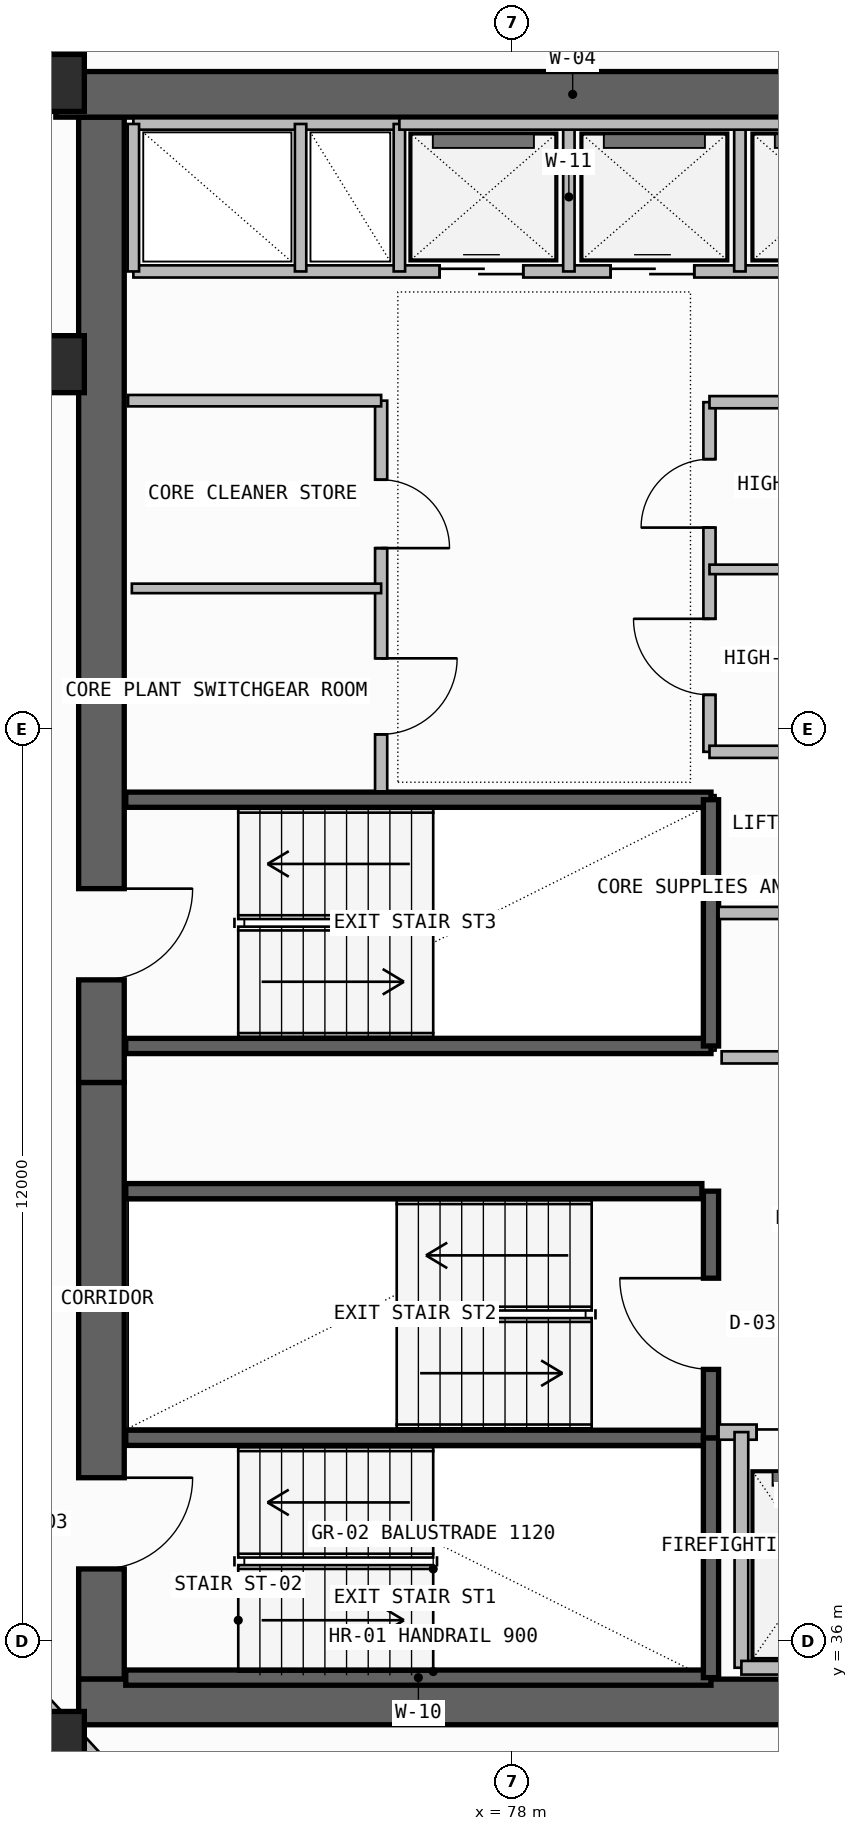
"""IFC4 building model, lengths in metres.
Left out: names, types, materials, properties, quantities, classifications, styles, units other than length and angle.
Written with IfcOpenShell. Run it as: python <this file> out.ifc"""

import sys

from ifc_helpers import new_model, si_unit, direction, frame, frame_2d, origin, origin_2d, place, context, subcontext, project, spatial, rectangle, extrude, element, fill, save


model = new_model("IFC4")
c1 = context("Model", 3, precision=1e-05, world=origin(), true_north=direction((0.0, 1.0)))
c2 = subcontext(c1, "Body", "Model", "MODEL_VIEW")
j1 = project(units=[si_unit("LENGTHUNIT", "METRE"), si_unit("PLANEANGLEUNIT", "RADIAN")], contexts=[c1])
p1 = place(None, origin())
s1 = spatial("IfcSite", under=j1, at=p1, CompositionType="ELEMENT")
p2 = place(p1, origin())
s2 = spatial("IfcBuilding", under=s1, at=p2, CompositionType="ELEMENT")
p3 = place(p2, frame((0.0, 0.0, 264.26)))
s3 = spatial("IfcBuildingStorey", under=s2, at=p3, CompositionType="ELEMENT", Elevation=264.26)
p4 = place(p3, frame((72.6, 35.5, -0.26), z_axis=(0.0, 0.0, 1.0), x_axis=(0.0, 1.0, 0.0)))
e1 = element("IfcWall", 1, at=p4, inside=s3, PredefinedType="SHEAR", context=c2, shape_type="SweptSolid", body=[
    extrude(rectangle(XDim=7.85, YDim=0.6, at=frame_2d((3.925, 0.0))), origin(), (0.0, 0.0, 1.0), 3.52),
])
p5 = place(p4, frame((1.45, 0.0, 0.26)))
e2 = element("IfcOpeningElement", 2, at=p5, cuts=e1, PredefinedType="OPENING", context=c2, shape_type="SweptSolid", body=[
    extrude(rectangle(XDim=1.2, YDim=2.2, at=frame_2d((0.6, 1.1))), frame((0.0, 0.31, 0.0), z_axis=(0.0, -1.0, 0.0), x_axis=(1.0, 0.0, 0.0)), (0.0, 0.0, 1.0), 0.62),
])
p6 = place(p3, frame((72.3, 35.2, -0.26), z_axis=(0.0, 0.0, 1.0), x_axis=(1.0, 0.0, 0.0)))
e3 = element("IfcWall", 3, at=p6, inside=s3, PredefinedType="SHEAR", context=c2, shape_type="SweptSolid", body=[
    extrude(rectangle(XDim=13.3, YDim=0.6, at=frame_2d((6.65, 0.0))), origin(), (0.0, 0.0, 1.0), 3.52),
])
p7 = place(p3, frame((72.6, 43.35, -0.26), z_axis=(0.0, 0.0, 1.0), x_axis=(0.0, 1.0, 0.0)))
e4 = element("IfcWall", 4, at=p7, inside=s3, PredefinedType="SHEAR", context=c2, shape_type="SweptSolid", body=[
    extrude(rectangle(XDim=12.7, YDim=0.6, at=frame_2d((6.35, 0.0))), origin(), (0.0, 0.0, 1.0), 3.52),
])
p8 = place(p7, frame((1.35, 0.0, 0.26)))
e5 = element("IfcOpeningElement", 5, at=p8, cuts=e4, PredefinedType="OPENING", context=c2, shape_type="SweptSolid", body=[
    extrude(rectangle(XDim=1.2, YDim=2.2, at=frame_2d((0.6, 1.1))), frame((0.0, 0.31, 0.0), z_axis=(0.0, -1.0, 0.0), x_axis=(1.0, 0.0, 0.0)), (0.0, 0.0, 1.0), 0.62),
])
p9 = place(p3, frame((72.0, 56.35, -0.26), z_axis=(0.0, 0.0, 1.0), x_axis=(1.0, 0.0, 0.0)))
e6 = element("IfcWall", 6, at=p9, inside=s3, PredefinedType="SHEAR", context=c2, shape_type="SweptSolid", body=[
    extrude(rectangle(XDim=13.6, YDim=0.6, at=frame_2d((6.8, 0.0))), origin(), (0.0, 0.0, 1.0), 3.52),
])
for number, where, z_axis, x_axis in (
    (7, (72.0, 34.7, 0.0), (0.0, 0.0, 1.0), (1.0, 0.0, 0.0)),
    (8, (72.0, 52.8, 0.0), (0.0, 0.0, 1.0), (1.0, 0.0, 0.0)),
    (9, (72.0, 56.5, 0.0), (0.0, 0.0, 1.0), (1.0, 0.0, 0.0)),
):
    element("IfcColumn", number, at=place(p3, frame(where, z_axis=z_axis, x_axis=x_axis)), inside=s3, PredefinedType="COLUMN", context=c2, shape_type="SweptSolid", body=[
        extrude(rectangle(XDim=0.75, YDim=0.75, at=origin_2d()), origin(), (0.0, 0.0, 1.0), 3.52),
    ])
p10 = place(p3, frame((72.881, 34.058, 0.0), z_axis=(0.0, 0.0, 1.0), x_axis=(-0.678651758246, 0.734460203843, 0.0)))
e10 = element("IfcWall", 10, at=p10, inside=s3, PredefinedType="PARAPET", context=c2, shape_type="SweptSolid", body=[
    extrude(rectangle(XDim=0.927, YDim=0.2, at=frame_2d((0.464, 0.0))), origin(), (0.0, 0.0, 1.0), 1.15),
])
p11 = place(p3, frame((72.059, 34.948, 0.0), z_axis=(0.0, 0.0, 1.0), x_axis=(-0.678740051818, 0.734378609478, 0.0)))
e11 = element("IfcWall", 11, at=p11, inside=s3, PredefinedType="PARAPET", context=c2, shape_type="SweptSolid", body=[
    extrude(rectangle(XDim=0.97, YDim=0.2, at=frame_2d((0.485, 0.0))), origin(), (0.0, 0.0, 1.0), 1.15),
])
for number, where, z_axis, x_axis in (
    (12, (72.92, 35.52, -0.26), (0.0, 0.0, 1.0), (1.0, 0.0, 0.0)),
    (13, (72.92, 38.675, -0.26), (0.0, 0.0, 1.0), (1.0, 0.0, 0.0)),
):
    element("IfcWall", number, at=place(p3, frame(where, z_axis=z_axis, x_axis=x_axis)), inside=s3, PredefinedType="SOLIDWALL", context=c2, shape_type="SweptSolid", body=[
        extrude(rectangle(XDim=7.7, YDim=0.2, at=frame_2d((3.85, 0.0))), origin(), (0.0, 0.0, 1.0), 3.52),
    ])
p12 = place(p3, frame((80.62, 35.52, -0.26), z_axis=(0.0, 0.0, 1.0), x_axis=(0.0, 1.0, 0.0)))
e14 = element("IfcWall", 14, at=p12, inside=s3, PredefinedType="SOLIDWALL", context=c2, shape_type="SweptSolid", body=[
    extrude(rectangle(XDim=3.155, YDim=0.2, at=frame_2d((1.578, 0.0))), origin(), (0.0, 0.0, 1.0), 3.52),
])
p13 = place(p3, frame((80.62, 38.675, -0.26), z_axis=(0.0, 0.0, 1.0), x_axis=(0.0, 1.0, 0.0)))
e15 = element("IfcWall", 15, at=p13, inside=s3, PredefinedType="SOLIDWALL", context=c2, shape_type="SweptSolid", body=[
    extrude(rectangle(XDim=3.245, YDim=0.2, at=frame_2d((1.623, 0.0))), origin(), (0.0, 0.0, 1.0), 3.52),
])
p14 = place(p13, frame((0.9, 0.0, 0.26)))
e16 = element("IfcOpeningElement", 16, at=p14, cuts=e15, PredefinedType="OPENING", context=c2, shape_type="SweptSolid", body=[
    extrude(rectangle(XDim=1.2, YDim=2.2, at=frame_2d((0.6, 1.1))), frame((0.0, 0.11, 0.0), z_axis=(0.0, -1.0, 0.0), x_axis=(1.0, 0.0, 0.0)), (0.0, 0.0, 1.0), 0.22),
])
p15 = place(p3, frame((80.72, 38.75, 0.0), z_axis=(0.0, 0.0, 1.0), x_axis=(1.0, 0.0, 0.0)))
e17 = element("IfcWall", 17, at=p15, inside=s3, PredefinedType="SOLIDWALL", context=c2, shape_type="SweptSolid", body=[
    extrude(rectangle(XDim=4.26, YDim=0.2, at=frame_2d((2.13, 0.0))), origin(), (0.0, 0.0, 1.0), 3.26),
])
p16 = place(p15, frame((0.5, 0.0, 0.0)))
e18 = element("IfcOpeningElement", 18, at=p16, cuts=e17, PredefinedType="OPENING", context=c2, shape_type="SweptSolid", body=[
    extrude(rectangle(XDim=1.3, YDim=2.3, at=frame_2d((0.65, 1.15))), frame((0.0, 0.11, 0.0), z_axis=(0.0, -1.0, 0.0), x_axis=(1.0, 0.0, 0.0)), (0.0, 0.0, 1.0), 0.22),
])
p17 = place(p15, frame((2.45, 0.0, 0.0)))
e19 = element("IfcOpeningElement", 19, at=p17, cuts=e17, PredefinedType="OPENING", context=c2, shape_type="SweptSolid", body=[
    extrude(rectangle(XDim=1.3, YDim=2.3, at=frame_2d((0.65, 1.15))), frame((0.0, 0.11, 0.0), z_axis=(0.0, -1.0, 0.0), x_axis=(1.0, 0.0, 0.0)), (0.0, 0.0, 1.0), 0.22),
])
p18 = place(p3, frame((81.02, 35.65, 0.0), z_axis=(0.0, 0.0, 1.0), x_axis=(0.0, 1.0, 0.0)))
e20 = element("IfcWall", 20, at=p18, inside=s3, PredefinedType="SOLIDWALL", context=c2, shape_type="SweptSolid", body=[
    extrude(rectangle(XDim=3.1, YDim=0.18, at=frame_2d((1.55, 0.0))), origin(), (0.0, 0.0, 1.0), 3.26),
])
p19 = place(p3, frame((81.02, 35.65, 0.0), z_axis=(0.0, 0.0, 1.0), x_axis=(1.0, 0.0, 0.0)))
e21 = element("IfcWall", 21, at=p19, inside=s3, PredefinedType="SOLIDWALL", context=c2, shape_type="SweptSolid", body=[
    extrude(rectangle(XDim=3.93, YDim=0.18, at=frame_2d((1.965, 0.0))), origin(), (0.0, 0.0, 1.0), 3.26),
])
p20 = place(p3, frame((72.92, 41.92, -0.26), z_axis=(0.0, 0.0, 1.0), x_axis=(1.0, 0.0, 0.0)))
e22 = element("IfcWall", 22, at=p20, inside=s3, PredefinedType="SOLIDWALL", context=c2, shape_type="SweptSolid", body=[
    extrude(rectangle(XDim=7.58, YDim=0.2, at=frame_2d((3.79, 0.0))), origin(), (0.0, 0.0, 1.0), 3.52),
])
for number, where, z_axis, x_axis in (
    (23, (72.92, 43.83, -0.26), (0.0, 0.0, 1.0), (1.0, 0.0, 0.0)),
    (24, (72.92, 47.07, -0.26), (0.0, 0.0, 1.0), (1.0, 0.0, 0.0)),
):
    element("IfcWall", number, at=place(p3, frame(where, z_axis=z_axis, x_axis=x_axis)), inside=s3, PredefinedType="SOLIDWALL", context=c2, shape_type="SweptSolid", body=[
        extrude(rectangle(XDim=7.7, YDim=0.2, at=frame_2d((3.85, 0.0))), origin(), (0.0, 0.0, 1.0), 3.52),
    ])
p21 = place(p3, frame((80.62, 43.83, -0.26), z_axis=(0.0, 0.0, 1.0), x_axis=(0.0, 1.0, 0.0)))
e25 = element("IfcWall", 25, at=p21, inside=s3, PredefinedType="SOLIDWALL", context=c2, shape_type="SweptSolid", body=[
    extrude(rectangle(XDim=3.24, YDim=0.2, at=frame_2d((1.62, 0.0))), origin(), (0.0, 0.0, 1.0), 3.52),
])
p22 = place(p3, frame((80.72, 45.58, 0.0), z_axis=(0.0, 0.0, 1.0), x_axis=(1.0, 0.0, 0.0)))
e26 = element("IfcWall", 26, at=p22, inside=s3, PredefinedType="PLUMBINGWALL", context=c2, shape_type="SweptSolid", body=[
    extrude(rectangle(XDim=4.23, YDim=0.16, at=frame_2d((2.115, 0.0))), origin(), (0.0, 0.0, 1.0), 3.26),
])
p23 = place(p22, frame((1.65, 0.0, 0.0)))
e27 = element("IfcOpeningElement", 27, at=p23, cuts=e26, PredefinedType="OPENING", context=c2, shape_type="SweptSolid", body=[
    extrude(rectangle(XDim=0.9, YDim=2.1, at=frame_2d((0.45, 1.05))), frame((0.0, 0.09, 0.0), z_axis=(0.0, -1.0, 0.0), x_axis=(1.0, 0.0, 0.0)), (0.0, 0.0, 1.0), 0.18),
])
p24 = place(p3, frame((80.76, 43.68, 0.0), z_axis=(0.0, 0.0, 1.0), x_axis=(1.0, 0.0, 0.0)))
e28 = element("IfcWall", 28, at=p24, inside=s3, PredefinedType="PLUMBINGWALL", context=c2, shape_type="SweptSolid", body=[
    extrude(rectangle(XDim=4.19, YDim=0.16, at=frame_2d((2.095, 0.0))), origin(), (0.0, 0.0, 1.0), 3.26),
])
p25 = place(p3, frame((76.28, 47.18, 0.0), z_axis=(0.0, 0.0, 1.0), x_axis=(0.0, 1.0, 0.0)))
e29 = element("IfcWall", 29, at=p25, inside=s3, PredefinedType="SOLIDWALL", context=c2, shape_type="SweptSolid", body=[
    extrude(rectangle(XDim=5.14, YDim=0.16, at=frame_2d((2.57, 0.0))), origin(), (0.0, 0.0, 1.0), 3.26),
])
p26 = place(p25, frame((0.75, 0.0, 0.0)))
e30 = element("IfcOpeningElement", 30, at=p26, cuts=e29, PredefinedType="OPENING", context=c2, shape_type="SweptSolid", body=[
    extrude(rectangle(XDim=1.0, YDim=2.2, at=frame_2d((0.5, 1.1))), frame((0.0, 0.09, 0.0), z_axis=(0.0, -1.0, 0.0), x_axis=(1.0, 0.0, 0.0)), (0.0, 0.0, 1.0), 0.18),
])
p27 = place(p25, frame((3.2, 0.0, 0.0)))
e31 = element("IfcOpeningElement", 31, at=p27, cuts=e29, PredefinedType="OPENING", context=c2, shape_type="SweptSolid", body=[
    extrude(rectangle(XDim=0.9, YDim=2.1, at=frame_2d((0.45, 1.05))), frame((0.0, 0.09, 0.0), z_axis=(0.0, -1.0, 0.0), x_axis=(1.0, 0.0, 0.0)), (0.0, 0.0, 1.0), 0.18),
])
p28 = place(p3, frame((72.95, 52.32, 0.0), z_axis=(0.0, 0.0, 1.0), x_axis=(1.0, 0.0, 0.0)))
e32 = element("IfcWall", 32, at=p28, inside=s3, PredefinedType="SOLIDWALL", context=c2, shape_type="SweptSolid", body=[
    extrude(rectangle(XDim=3.33, YDim=0.15, at=frame_2d((1.665, 0.0))), origin(), (0.0, 0.0, 1.0), 3.26),
])
p29 = place(p3, frame((73.0, 49.85, 0.0), z_axis=(0.0, 0.0, 1.0), x_axis=(1.0, 0.0, 0.0)))
e33 = element("IfcWall", 33, at=p29, inside=s3, PredefinedType="PARTITIONING", context=c2, shape_type="SweptSolid", body=[
    extrude(rectangle(XDim=3.28, YDim=0.125, at=frame_2d((1.64, 0.0))), origin(), (0.0, 0.0, 1.0), 3.26),
])
p30 = place(p3, frame((80.6, 47.7, 0.0), z_axis=(0.0, 0.0, 1.0), x_axis=(0.0, 1.0, 0.0)))
e34 = element("IfcWall", 34, at=p30, inside=s3, PredefinedType="SOLIDWALL", context=c2, shape_type="SweptSolid", body=[
    extrude(rectangle(XDim=4.6, YDim=0.16, at=frame_2d((2.3, 0.0))), origin(), (0.0, 0.0, 1.0), 3.26),
])
p31 = place(p30, frame((0.75, 0.0, 0.0)))
e35 = element("IfcOpeningElement", 35, at=p31, cuts=e34, PredefinedType="OPENING", context=c2, shape_type="SweptSolid", body=[
    extrude(rectangle(XDim=1.0, YDim=2.2, at=frame_2d((0.5, 1.1))), frame((0.0, 0.09, 0.0), z_axis=(0.0, -1.0, 0.0), x_axis=(1.0, 0.0, 0.0)), (0.0, 0.0, 1.0), 0.18),
])
p32 = place(p30, frame((2.95, 0.0, 0.0)))
e36 = element("IfcOpeningElement", 36, at=p32, cuts=e34, PredefinedType="OPENING", context=c2, shape_type="SweptSolid", body=[
    extrude(rectangle(XDim=0.9, YDim=2.1, at=frame_2d((0.45, 1.05))), frame((0.0, 0.09, 0.0), z_axis=(0.0, -1.0, 0.0), x_axis=(1.0, 0.0, 0.0)), (0.0, 0.0, 1.0), 0.18),
])
p33 = place(p3, frame((80.6, 47.7, 0.0), z_axis=(0.0, 0.0, 1.0), x_axis=(1.0, 0.0, 0.0)))
e37 = element("IfcWall", 37, at=p33, inside=s3, PredefinedType="SOLIDWALL", context=c2, shape_type="SweptSolid", body=[
    extrude(rectangle(XDim=4.4, YDim=0.16, at=frame_2d((2.2, 0.0))), origin(), (0.0, 0.0, 1.0), 3.26),
])
p34 = place(p3, frame((80.6, 52.3, 0.0), z_axis=(0.0, 0.0, 1.0), x_axis=(1.0, 0.0, 0.0)))
e38 = element("IfcWall", 38, at=p34, inside=s3, PredefinedType="SOLIDWALL", context=c2, shape_type="SweptSolid", body=[
    extrude(rectangle(XDim=4.22, YDim=0.16, at=frame_2d((2.11, 0.0))), origin(), (0.0, 0.0, 1.0), 3.26),
])
p35 = place(p3, frame((80.6, 50.1, 0.0), z_axis=(0.0, 0.0, 1.0), x_axis=(1.0, 0.0, 0.0)))
e39 = element("IfcWall", 39, at=p35, inside=s3, PredefinedType="PARTITIONING", context=c2, shape_type="SweptSolid", body=[
    extrude(rectangle(XDim=4.22, YDim=0.125, at=frame_2d((2.11, 0.0))), origin(), (0.0, 0.0, 1.0), 3.26),
])
p36 = place(p3, frame((73.02, 54.02, 0.0), z_axis=(0.0, 0.0, 1.0), x_axis=(1.0, 0.0, 0.0)))
e40 = element("IfcWall", 40, at=p36, inside=s3, PredefinedType="SOLIDWALL", context=c2, shape_type="SweptSolid", body=[
    extrude(rectangle(XDim=12.08, YDim=0.16, at=frame_2d((6.04, 0.0))), origin(), (0.0, 0.0, 1.0), 3.26),
])
p37 = place(p36, frame((4.03, 0.0, 0.0)))
e41 = element("IfcOpeningElement", 41, at=p37, cuts=e40, PredefinedType="OPENING", context=c2, shape_type="SweptSolid", body=[
    extrude(rectangle(XDim=1.1, YDim=2.25, at=frame_2d((0.55, 1.125))), frame((0.0, 0.09, 0.0), z_axis=(0.0, -1.0, 0.0), x_axis=(1.0, 0.0, 0.0)), (0.0, 0.0, 1.0), 0.18),
])
p38 = place(p36, frame((6.28, 0.0, 0.0)))
e42 = element("IfcOpeningElement", 42, at=p38, cuts=e40, PredefinedType="OPENING", context=c2, shape_type="SweptSolid", body=[
    extrude(rectangle(XDim=1.1, YDim=2.25, at=frame_2d((0.55, 1.125))), frame((0.0, 0.09, 0.0), z_axis=(0.0, -1.0, 0.0), x_axis=(1.0, 0.0, 0.0)), (0.0, 0.0, 1.0), 0.18),
])
p39 = place(p36, frame((8.53, 0.0, 0.0)))
e43 = element("IfcOpeningElement", 43, at=p39, cuts=e40, PredefinedType="OPENING", context=c2, shape_type="SweptSolid", body=[
    extrude(rectangle(XDim=1.1, YDim=2.25, at=frame_2d((0.55, 1.125))), frame((0.0, 0.09, 0.0), z_axis=(0.0, -1.0, 0.0), x_axis=(1.0, 0.0, 0.0)), (0.0, 0.0, 1.0), 0.18),
])
p40 = place(p3, frame((73.02, 55.96, 0.0), z_axis=(0.0, 0.0, 1.0), x_axis=(1.0, 0.0, 0.0)))
e44 = element("IfcWall", 44, at=p40, inside=s3, PredefinedType="SOLIDWALL", context=c2, shape_type="SweptSolid", body=[
    extrude(rectangle(XDim=3.5, YDim=0.15, at=frame_2d((1.75, 0.0))), origin(), (0.0, 0.0, 1.0), 3.26),
])
p41 = place(p3, frame((73.02, 54.02, 0.0), z_axis=(0.0, 0.0, 1.0), x_axis=(0.0, 1.0, 0.0)))
e45 = element("IfcWall", 45, at=p41, inside=s3, PredefinedType="PLUMBINGWALL", context=c2, shape_type="SweptSolid", body=[
    extrude(rectangle(XDim=1.94, YDim=0.15, at=frame_2d((0.97, 0.0))), origin(), (0.0, 0.0, 1.0), 3.26),
])
p42 = place(p3, frame((76.52, 54.02, 0.0), z_axis=(0.0, 0.0, 1.0), x_axis=(0.0, 1.0, 0.0)))
e46 = element("IfcWall", 46, at=p42, inside=s3, PredefinedType="SOLIDWALL", context=c2, shape_type="SweptSolid", body=[
    extrude(rectangle(XDim=1.94, YDim=0.15, at=frame_2d((0.97, 0.0))), origin(), (0.0, 0.0, 1.0), 3.26),
])
p43 = place(p3, frame((75.22, 54.02, 0.0), z_axis=(0.0, 0.0, 1.0), x_axis=(0.0, 1.0, 0.0)))
e47 = element("IfcWall", 47, at=p43, inside=s3, PredefinedType="PLUMBINGWALL", context=c2, shape_type="SweptSolid", body=[
    extrude(rectangle(XDim=1.94, YDim=0.15, at=frame_2d((0.97, 0.0))), origin(), (0.0, 0.0, 1.0), 3.26),
])
for number, where, z_axis, x_axis in (
    (48, (78.75, 54.02, 0.0), (0.0, 0.0, 1.0), (0.0, 1.0, 0.0)),
    (49, (81.0, 54.02, 0.0), (0.0, 0.0, 1.0), (0.0, 1.0, 0.0)),
):
    element("IfcWall", number, at=place(p3, frame(where, z_axis=z_axis, x_axis=x_axis)), inside=s3, PredefinedType="PLUMBINGWALL", context=c2, shape_type="SweptSolid", body=[
        extrude(rectangle(XDim=1.96, YDim=0.15, at=frame_2d((0.98, 0.0))), origin(), (0.0, 0.0, 1.0), 3.26),
    ])
p44 = place(p3, frame((76.52, 55.96, 0.0), z_axis=(0.0, 0.0, 1.0), x_axis=(1.0, 0.0, 0.0)))
e50 = element("IfcWall", 50, at=p44, inside=s3, PredefinedType="SOLIDWALL", context=c2, shape_type="SweptSolid", body=[
    extrude(rectangle(XDim=6.7, YDim=0.15, at=frame_2d((3.35, 0.0))), origin(), (0.0, 0.0, 1.0), 3.26),
])
p45 = place(p5, frame((1.2, 0.0, 0.0), z_axis=(0.0, 0.0, 1.0), x_axis=(-1.0, 0.0, 0.0)))
e51 = element("IfcDoor", 51, at=p45, inside=s3, OperationType="SINGLE_SWING_LEFT", PredefinedType="USERDEFINED", context=c2, shape_type="SweptSolid", body=[
    extrude(rectangle(XDim=1.2, YDim=2.2, at=frame_2d((0.6, 1.1))), frame((0.0, 0.025, 0.0), z_axis=(0.0, -1.0, 0.0), x_axis=(1.0, 0.0, 0.0)), (0.0, 0.0, 1.0), 0.05),
])
fill(e2, e51)
p46 = place(p14, origin())
e52 = element("IfcDoor", 52, at=p46, inside=s3, OperationType="SINGLE_SWING_RIGHT", PredefinedType="USERDEFINED", context=c2, shape_type="SweptSolid", body=[
    extrude(rectangle(XDim=1.2, YDim=2.2, at=frame_2d((0.6, 1.1))), frame((0.0, 0.025, 0.0), z_axis=(0.0, -1.0, 0.0), x_axis=(1.0, 0.0, 0.0)), (0.0, 0.0, 1.0), 0.05),
])
fill(e16, e52)
p47 = place(p16, origin())
e53 = element("IfcDoor", 53, at=p47, inside=s3, OperationType="DOUBLE_DOOR_SLIDING", PredefinedType="DOOR", context=c2, shape_type="SweptSolid", body=[
    extrude(rectangle(XDim=1.3, YDim=2.3, at=frame_2d((0.65, 1.15))), frame((0.0, 0.025, 0.0), z_axis=(0.0, -1.0, 0.0), x_axis=(1.0, 0.0, 0.0)), (0.0, 0.0, 1.0), 0.05),
])
fill(e18, e53)
p48 = place(p8, frame((1.2, 0.0, 0.0), z_axis=(0.0, 0.0, 1.0), x_axis=(-1.0, 0.0, 0.0)))
e54 = element("IfcDoor", 54, at=p48, inside=s3, OperationType="SINGLE_SWING_LEFT", PredefinedType="USERDEFINED", context=c2, shape_type="SweptSolid", body=[
    extrude(rectangle(XDim=1.2, YDim=2.2, at=frame_2d((0.6, 1.1))), frame((0.0, 0.025, 0.0), z_axis=(0.0, -1.0, 0.0), x_axis=(1.0, 0.0, 0.0)), (0.0, 0.0, 1.0), 0.05),
])
fill(e5, e54)
p49 = place(p26, frame((1.0, 0.0, 0.0), z_axis=(0.0, 0.0, 1.0), x_axis=(-1.0, 0.0, 0.0)))
e55 = element("IfcDoor", 55, at=p49, inside=s3, OperationType="SINGLE_SWING_LEFT", PredefinedType="DOOR", context=c2, shape_type="SweptSolid", body=[
    extrude(rectangle(XDim=1.0, YDim=2.2, at=frame_2d((0.5, 1.1))), frame((0.0, 0.025, 0.0), z_axis=(0.0, -1.0, 0.0), x_axis=(1.0, 0.0, 0.0)), (0.0, 0.0, 1.0), 0.05),
])
fill(e30, e55)
p50 = place(p27, frame((0.9, 0.0, 0.0), z_axis=(0.0, 0.0, 1.0), x_axis=(-1.0, 0.0, 0.0)))
e56 = element("IfcDoor", 56, at=p50, inside=s3, OperationType="SINGLE_SWING_RIGHT", PredefinedType="DOOR", context=c2, shape_type="SweptSolid", body=[
    extrude(rectangle(XDim=0.9, YDim=2.1, at=frame_2d((0.45, 1.05))), frame((0.0, 0.025, 0.0), z_axis=(0.0, -1.0, 0.0), x_axis=(1.0, 0.0, 0.0)), (0.0, 0.0, 1.0), 0.05),
])
fill(e31, e56)
p51 = place(p31, origin())
e57 = element("IfcDoor", 57, at=p51, inside=s3, OperationType="SINGLE_SWING_RIGHT", PredefinedType="DOOR", context=c2, shape_type="SweptSolid", body=[
    extrude(rectangle(XDim=1.0, YDim=2.2, at=frame_2d((0.5, 1.1))), frame((0.0, 0.025, 0.0), z_axis=(0.0, -1.0, 0.0), x_axis=(1.0, 0.0, 0.0)), (0.0, 0.0, 1.0), 0.05),
])
fill(e35, e57)
p52 = place(p32, origin())
e58 = element("IfcDoor", 58, at=p52, inside=s3, OperationType="SINGLE_SWING_LEFT", PredefinedType="DOOR", context=c2, shape_type="SweptSolid", body=[
    extrude(rectangle(XDim=0.9, YDim=2.1, at=frame_2d((0.45, 1.05))), frame((0.0, 0.025, 0.0), z_axis=(0.0, -1.0, 0.0), x_axis=(1.0, 0.0, 0.0)), (0.0, 0.0, 1.0), 0.05),
])
fill(e36, e58)
p53 = place(p37, origin())
e59 = element("IfcDoor", 59, at=p53, inside=s3, OperationType="DOUBLE_DOOR_SLIDING", PredefinedType="DOOR", context=c2, shape_type="SweptSolid", body=[
    extrude(rectangle(XDim=1.1, YDim=2.25, at=frame_2d((0.55, 1.125))), frame((0.0, 0.025, 0.0), z_axis=(0.0, -1.0, 0.0), x_axis=(1.0, 0.0, 0.0)), (0.0, 0.0, 1.0), 0.05),
])
fill(e41, e59)
p54 = place(p38, origin())
e60 = element("IfcDoor", 60, at=p54, inside=s3, OperationType="DOUBLE_DOOR_SLIDING", PredefinedType="DOOR", context=c2, shape_type="SweptSolid", body=[
    extrude(rectangle(XDim=1.1, YDim=2.25, at=frame_2d((0.55, 1.125))), frame((0.0, 0.025, 0.0), z_axis=(0.0, -1.0, 0.0), x_axis=(1.0, 0.0, 0.0)), (0.0, 0.0, 1.0), 0.05),
])
fill(e42, e60)
save(model, sys.argv[1])
